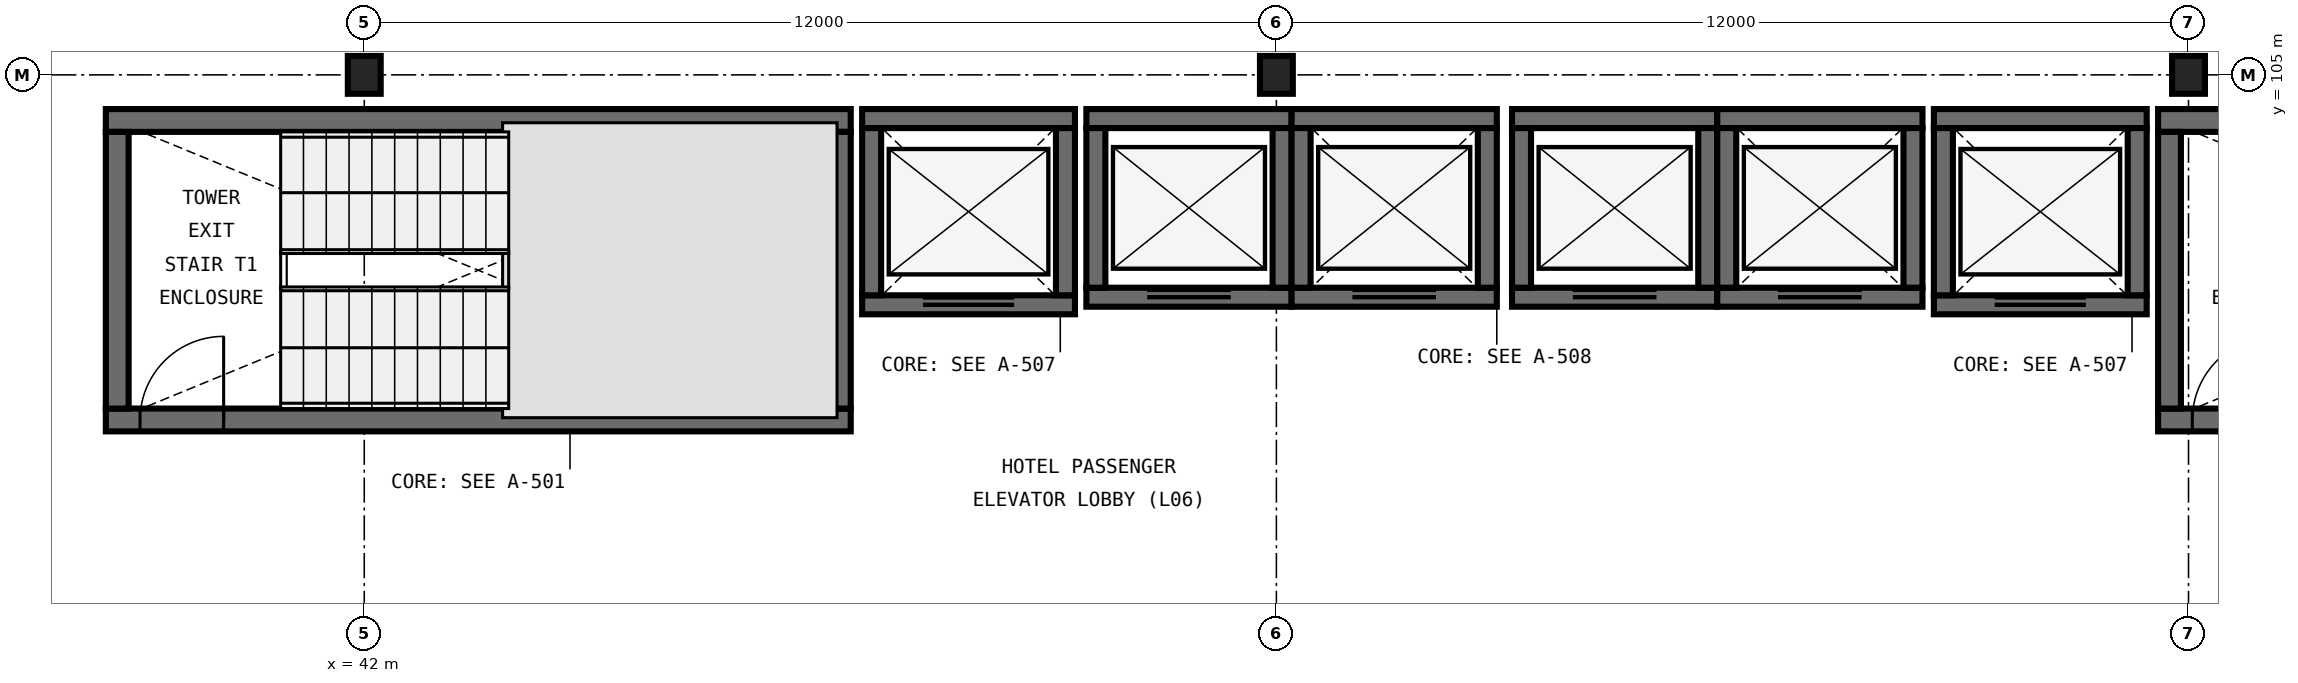
"""IFC4 building model, lengths in metres.
Left out: names, types, materials, properties, quantities, classifications, styles, units other than length and angle.
Written with IfcOpenShell. Run it as: python <this file> out.ifc"""

import sys

from ifc_helpers import new_model, si_unit, direction, frame, frame_2d, origin, origin_2d, place, context, subcontext, project, spatial, rectangle, i_section, extrude, element, fill, save


model = new_model("IFC4")
c1 = context("Model", 3, precision=1e-05, world=origin(), true_north=direction((0.0, 1.0)))
c2 = subcontext(c1, "Body", "Model", "MODEL_VIEW")
j1 = project(units=[si_unit("LENGTHUNIT", "METRE"), si_unit("PLANEANGLEUNIT", "RADIAN")], contexts=[c1])
p1 = place(None, origin())
s1 = spatial("IfcSite", under=j1, at=p1, CompositionType="ELEMENT")
p2 = place(p1, origin())
s2 = spatial("IfcBuilding", under=s1, at=p2, CompositionType="ELEMENT")
p3 = place(p2, frame((0.0, 0.0, 31.2)))
s3 = spatial("IfcBuildingStorey", under=s2, at=p3, CompositionType="ELEMENT", Elevation=31.2)
for number, where, z_axis, x_axis in (
    (1, (42.0, 105.0, 0.0), (0.0, 0.0, 1.0), (1.0, 0.0, 0.0)),
    (2, (54.0, 105.0, 0.0), (0.0, 0.0, 1.0), (1.0, 0.0, 0.0)),
    (3, (66.0, 105.0, 0.0), (0.0, 0.0, 1.0), (1.0, 0.0, 0.0)),
):
    element("IfcColumn", number, at=place(p3, frame(where, z_axis=z_axis, x_axis=x_axis)), inside=s3, PredefinedType="COLUMN", context=c2, shape_type="SweptSolid", body=[
        extrude(i_section(OverallWidth=0.432, OverallDepth=0.498, WebThickness=0.056, FlangeThickness=0.089, FilletRadius=0.031, at=origin_2d()), origin(), (0.0, 0.0, 1.0), 3.6),
    ])
p4 = place(p3, frame((38.6, 100.46, 0.0), z_axis=(0.0, 0.0, 1.0), x_axis=(1.0, 0.0, 0.0)))
e4 = element("IfcWall", 4, at=p4, inside=s3, PredefinedType="SHEAR", context=c2, shape_type="SweptSolid", body=[
    extrude(rectangle(XDim=9.8, YDim=0.3, at=frame_2d((4.9, 0.0))), origin(), (0.0, 0.0, 1.0), 3.6),
])
p5 = place(p4, frame((0.45, 0.0, 0.0)))
e5 = element("IfcOpeningElement", 5, at=p5, cuts=e4, PredefinedType="OPENING", context=c2, shape_type="SweptSolid", body=[
    extrude(rectangle(XDim=1.1, YDim=2.2, at=frame_2d((0.55, 1.1))), frame((0.0, 0.165, 0.0), z_axis=(0.0, -1.0, 0.0), x_axis=(1.0, 0.0, 0.0)), (0.0, 0.0, 1.0), 0.33),
])
p6 = place(p3, frame((48.4, 104.4, 0.0), z_axis=(0.0, 0.0, 1.0), x_axis=(-1.0, 0.0, 0.0)))
e6 = element("IfcWall", 6, at=p6, inside=s3, PredefinedType="SHEAR", context=c2, shape_type="SweptSolid", body=[
    extrude(rectangle(XDim=9.8, YDim=0.3, at=frame_2d((4.9, 0.0))), origin(), (0.0, 0.0, 1.0), 3.6),
])
for number, where, z_axis, x_axis in (
    (7, (38.75, 104.25, 0.0), (0.0, 0.0, 1.0), (0.0, -1.0, 0.0)),
    (8, (48.25, 100.61, 0.0), (0.0, 0.0, 1.0), (0.0, 1.0, 0.0)),
):
    element("IfcWall", number, at=place(p3, frame(where, z_axis=z_axis, x_axis=x_axis)), inside=s3, PredefinedType="SHEAR", context=c2, shape_type="SweptSolid", body=[
        extrude(rectangle(XDim=3.64, YDim=0.3, at=frame_2d((1.82, 0.0))), origin(), (0.0, 0.0, 1.0), 3.6),
    ])
p7 = place(p3, frame((65.6, 100.46, 0.0), z_axis=(0.0, 0.0, 1.0), x_axis=(1.0, 0.0, 0.0)))
e9 = element("IfcWall", 9, at=p7, inside=s3, PredefinedType="SHEAR", context=c2, shape_type="SweptSolid", body=[
    extrude(rectangle(XDim=9.8, YDim=0.3, at=frame_2d((4.9, 0.0))), origin(), (0.0, 0.0, 1.0), 3.6),
])
p8 = place(p7, frame((0.45, 0.0, 0.0)))
e10 = element("IfcOpeningElement", 10, at=p8, cuts=e9, PredefinedType="OPENING", context=c2, shape_type="SweptSolid", body=[
    extrude(rectangle(XDim=1.1, YDim=2.2, at=frame_2d((0.55, 1.1))), frame((0.0, 0.165, 0.0), z_axis=(0.0, -1.0, 0.0), x_axis=(1.0, 0.0, 0.0)), (0.0, 0.0, 1.0), 0.33),
])
p9 = place(p3, frame((75.4, 104.4, 0.0), z_axis=(0.0, 0.0, 1.0), x_axis=(-1.0, 0.0, 0.0)))
e11 = element("IfcWall", 11, at=p9, inside=s3, PredefinedType="SHEAR", context=c2, shape_type="SweptSolid", body=[
    extrude(rectangle(XDim=9.8, YDim=0.3, at=frame_2d((4.9, 0.0))), origin(), (0.0, 0.0, 1.0), 3.6),
])
p10 = place(p3, frame((65.75, 104.25, 0.0), z_axis=(0.0, 0.0, 1.0), x_axis=(0.0, -1.0, 0.0)))
e12 = element("IfcWall", 12, at=p10, inside=s3, PredefinedType="SHEAR", context=c2, shape_type="SweptSolid", body=[
    extrude(rectangle(XDim=3.64, YDim=0.3, at=frame_2d((1.82, 0.0))), origin(), (0.0, 0.0, 1.0), 3.6),
])
p11 = place(p3, frame((48.55, 101.975, 0.0), z_axis=(0.0, 0.0, 1.0), x_axis=(1.0, 0.0, 0.0)))
e13 = element("IfcWall", 13, at=p11, inside=s3, PredefinedType="SHEAR", context=c2, shape_type="SweptSolid", body=[
    extrude(rectangle(XDim=2.8, YDim=0.25, at=frame_2d((1.4, 0.0))), origin(), (0.0, 0.0, 1.0), 3.6),
])
p12 = place(p11, frame((0.8, 0.0, 0.0)))
e14 = element("IfcOpeningElement", 14, at=p12, cuts=e13, PredefinedType="OPENING", context=c2, shape_type="SweptSolid", body=[
    extrude(rectangle(XDim=1.2, YDim=2.2, at=frame_2d((0.6, 1.1))), frame((0.0, 0.14, 0.0), z_axis=(0.0, -1.0, 0.0), x_axis=(1.0, 0.0, 0.0)), (0.0, 0.0, 1.0), 0.28),
])
p13 = place(p3, frame((51.35, 104.425, 0.0), z_axis=(0.0, 0.0, 1.0), x_axis=(-1.0, 0.0, 0.0)))
e15 = element("IfcWall", 15, at=p13, inside=s3, PredefinedType="SHEAR", context=c2, shape_type="SweptSolid", body=[
    extrude(rectangle(XDim=2.8, YDim=0.25, at=frame_2d((1.4, 0.0))), origin(), (0.0, 0.0, 1.0), 3.6),
])
for number, where, z_axis, x_axis in (
    (16, (48.675, 104.3, 0.0), (0.0, 0.0, 1.0), (0.0, -1.0, 0.0)),
    (17, (51.225, 102.1, 0.0), (0.0, 0.0, 1.0), (0.0, 1.0, 0.0)),
):
    element("IfcWall", number, at=place(p3, frame(where, z_axis=z_axis, x_axis=x_axis)), inside=s3, PredefinedType="SHEAR", context=c2, shape_type="SweptSolid", body=[
        extrude(rectangle(XDim=2.2, YDim=0.25, at=frame_2d((1.1, 0.0))), origin(), (0.0, 0.0, 1.0), 3.6),
    ])
p14 = place(p3, frame((62.65, 101.975, 0.0), z_axis=(0.0, 0.0, 1.0), x_axis=(1.0, 0.0, 0.0)))
e18 = element("IfcWall", 18, at=p14, inside=s3, PredefinedType="SHEAR", context=c2, shape_type="SweptSolid", body=[
    extrude(rectangle(XDim=2.8, YDim=0.25, at=frame_2d((1.4, 0.0))), origin(), (0.0, 0.0, 1.0), 3.6),
])
p15 = place(p14, frame((0.8, 0.0, 0.0)))
e19 = element("IfcOpeningElement", 19, at=p15, cuts=e18, PredefinedType="OPENING", context=c2, shape_type="SweptSolid", body=[
    extrude(rectangle(XDim=1.2, YDim=2.2, at=frame_2d((0.6, 1.1))), frame((0.0, 0.14, 0.0), z_axis=(0.0, -1.0, 0.0), x_axis=(1.0, 0.0, 0.0)), (0.0, 0.0, 1.0), 0.28),
])
p16 = place(p3, frame((65.45, 104.425, 0.0), z_axis=(0.0, 0.0, 1.0), x_axis=(-1.0, 0.0, 0.0)))
e20 = element("IfcWall", 20, at=p16, inside=s3, PredefinedType="SHEAR", context=c2, shape_type="SweptSolid", body=[
    extrude(rectangle(XDim=2.8, YDim=0.25, at=frame_2d((1.4, 0.0))), origin(), (0.0, 0.0, 1.0), 3.6),
])
for number, where, z_axis, x_axis in (
    (21, (62.775, 104.3, 0.0), (0.0, 0.0, 1.0), (0.0, -1.0, 0.0)),
    (22, (65.325, 102.1, 0.0), (0.0, 0.0, 1.0), (0.0, 1.0, 0.0)),
):
    element("IfcWall", number, at=place(p3, frame(where, z_axis=z_axis, x_axis=x_axis)), inside=s3, PredefinedType="SHEAR", context=c2, shape_type="SweptSolid", body=[
        extrude(rectangle(XDim=2.2, YDim=0.25, at=frame_2d((1.1, 0.0))), origin(), (0.0, 0.0, 1.0), 3.6),
    ])
p17 = place(p3, frame((51.5, 102.075, 0.0), z_axis=(0.0, 0.0, 1.0), x_axis=(1.0, 0.0, 0.0)))
e23 = element("IfcWall", 23, at=p17, inside=s3, PredefinedType="SHEAR", context=c2, shape_type="SweptSolid", body=[
    extrude(rectangle(XDim=2.7, YDim=0.25, at=frame_2d((1.35, 0.0))), origin(), (0.0, 0.0, 1.0), 3.6),
])
p18 = place(p17, frame((0.8, 0.0, 0.0)))
e24 = element("IfcOpeningElement", 24, at=p18, cuts=e23, PredefinedType="OPENING", context=c2, shape_type="SweptSolid", body=[
    extrude(rectangle(XDim=1.1, YDim=2.2, at=frame_2d((0.55, 1.1))), frame((0.0, 0.14, 0.0), z_axis=(0.0, -1.0, 0.0), x_axis=(1.0, 0.0, 0.0)), (0.0, 0.0, 1.0), 0.28),
])
p19 = place(p3, frame((54.2, 104.425, 0.0), z_axis=(0.0, 0.0, 1.0), x_axis=(-1.0, 0.0, 0.0)))
e25 = element("IfcWall", 25, at=p19, inside=s3, PredefinedType="SHEAR", context=c2, shape_type="SweptSolid", body=[
    extrude(rectangle(XDim=2.7, YDim=0.25, at=frame_2d((1.35, 0.0))), origin(), (0.0, 0.0, 1.0), 3.6),
])
for number, where, z_axis, x_axis in (
    (26, (51.625, 104.3, 0.0), (0.0, 0.0, 1.0), (0.0, -1.0, 0.0)),
    (27, (54.075, 102.2, 0.0), (0.0, 0.0, 1.0), (0.0, 1.0, 0.0)),
):
    element("IfcWall", number, at=place(p3, frame(where, z_axis=z_axis, x_axis=x_axis)), inside=s3, PredefinedType="SHEAR", context=c2, shape_type="SweptSolid", body=[
        extrude(rectangle(XDim=2.1, YDim=0.25, at=frame_2d((1.05, 0.0))), origin(), (0.0, 0.0, 1.0), 3.6),
    ])
p20 = place(p3, frame((54.2, 102.075, 0.0), z_axis=(0.0, 0.0, 1.0), x_axis=(1.0, 0.0, 0.0)))
e28 = element("IfcWall", 28, at=p20, inside=s3, PredefinedType="SHEAR", context=c2, shape_type="SweptSolid", body=[
    extrude(rectangle(XDim=2.7, YDim=0.25, at=frame_2d((1.35, 0.0))), origin(), (0.0, 0.0, 1.0), 3.6),
])
p21 = place(p20, frame((0.8, 0.0, 0.0)))
e29 = element("IfcOpeningElement", 29, at=p21, cuts=e28, PredefinedType="OPENING", context=c2, shape_type="SweptSolid", body=[
    extrude(rectangle(XDim=1.1, YDim=2.2, at=frame_2d((0.55, 1.1))), frame((0.0, 0.14, 0.0), z_axis=(0.0, -1.0, 0.0), x_axis=(1.0, 0.0, 0.0)), (0.0, 0.0, 1.0), 0.28),
])
p22 = place(p3, frame((56.9, 104.425, 0.0), z_axis=(0.0, 0.0, 1.0), x_axis=(-1.0, 0.0, 0.0)))
e30 = element("IfcWall", 30, at=p22, inside=s3, PredefinedType="SHEAR", context=c2, shape_type="SweptSolid", body=[
    extrude(rectangle(XDim=2.7, YDim=0.25, at=frame_2d((1.35, 0.0))), origin(), (0.0, 0.0, 1.0), 3.6),
])
for number, where, z_axis, x_axis in (
    (31, (54.325, 104.3, 0.0), (0.0, 0.0, 1.0), (0.0, -1.0, 0.0)),
    (32, (56.775, 102.2, 0.0), (0.0, 0.0, 1.0), (0.0, 1.0, 0.0)),
):
    element("IfcWall", number, at=place(p3, frame(where, z_axis=z_axis, x_axis=x_axis)), inside=s3, PredefinedType="SHEAR", context=c2, shape_type="SweptSolid", body=[
        extrude(rectangle(XDim=2.1, YDim=0.25, at=frame_2d((1.05, 0.0))), origin(), (0.0, 0.0, 1.0), 3.6),
    ])
p23 = place(p3, frame((57.1, 102.075, 0.0), z_axis=(0.0, 0.0, 1.0), x_axis=(1.0, 0.0, 0.0)))
e33 = element("IfcWall", 33, at=p23, inside=s3, PredefinedType="SHEAR", context=c2, shape_type="SweptSolid", body=[
    extrude(rectangle(XDim=2.7, YDim=0.25, at=frame_2d((1.35, 0.0))), origin(), (0.0, 0.0, 1.0), 3.6),
])
p24 = place(p23, frame((0.8, 0.0, 0.0)))
e34 = element("IfcOpeningElement", 34, at=p24, cuts=e33, PredefinedType="OPENING", context=c2, shape_type="SweptSolid", body=[
    extrude(rectangle(XDim=1.1, YDim=2.2, at=frame_2d((0.55, 1.1))), frame((0.0, 0.14, 0.0), z_axis=(0.0, -1.0, 0.0), x_axis=(1.0, 0.0, 0.0)), (0.0, 0.0, 1.0), 0.28),
])
p25 = place(p3, frame((59.8, 104.425, 0.0), z_axis=(0.0, 0.0, 1.0), x_axis=(-1.0, 0.0, 0.0)))
e35 = element("IfcWall", 35, at=p25, inside=s3, PredefinedType="SHEAR", context=c2, shape_type="SweptSolid", body=[
    extrude(rectangle(XDim=2.7, YDim=0.25, at=frame_2d((1.35, 0.0))), origin(), (0.0, 0.0, 1.0), 3.6),
])
for number, where, z_axis, x_axis in (
    (36, (57.225, 104.3, 0.0), (0.0, 0.0, 1.0), (0.0, -1.0, 0.0)),
    (37, (59.675, 102.2, 0.0), (0.0, 0.0, 1.0), (0.0, 1.0, 0.0)),
):
    element("IfcWall", number, at=place(p3, frame(where, z_axis=z_axis, x_axis=x_axis)), inside=s3, PredefinedType="SHEAR", context=c2, shape_type="SweptSolid", body=[
        extrude(rectangle(XDim=2.1, YDim=0.25, at=frame_2d((1.05, 0.0))), origin(), (0.0, 0.0, 1.0), 3.6),
    ])
p26 = place(p3, frame((59.8, 102.075, 0.0), z_axis=(0.0, 0.0, 1.0), x_axis=(1.0, 0.0, 0.0)))
e38 = element("IfcWall", 38, at=p26, inside=s3, PredefinedType="SHEAR", context=c2, shape_type="SweptSolid", body=[
    extrude(rectangle(XDim=2.7, YDim=0.25, at=frame_2d((1.35, 0.0))), origin(), (0.0, 0.0, 1.0), 3.6),
])
p27 = place(p26, frame((0.8, 0.0, 0.0)))
e39 = element("IfcOpeningElement", 39, at=p27, cuts=e38, PredefinedType="OPENING", context=c2, shape_type="SweptSolid", body=[
    extrude(rectangle(XDim=1.1, YDim=2.2, at=frame_2d((0.55, 1.1))), frame((0.0, 0.14, 0.0), z_axis=(0.0, -1.0, 0.0), x_axis=(1.0, 0.0, 0.0)), (0.0, 0.0, 1.0), 0.28),
])
p28 = place(p3, frame((62.5, 104.425, 0.0), z_axis=(0.0, 0.0, 1.0), x_axis=(-1.0, 0.0, 0.0)))
e40 = element("IfcWall", 40, at=p28, inside=s3, PredefinedType="SHEAR", context=c2, shape_type="SweptSolid", body=[
    extrude(rectangle(XDim=2.7, YDim=0.25, at=frame_2d((1.35, 0.0))), origin(), (0.0, 0.0, 1.0), 3.6),
])
for number, where, z_axis, x_axis in (
    (41, (59.925, 104.3, 0.0), (0.0, 0.0, 1.0), (0.0, -1.0, 0.0)),
    (42, (62.375, 102.2, 0.0), (0.0, 0.0, 1.0), (0.0, 1.0, 0.0)),
):
    element("IfcWall", number, at=place(p3, frame(where, z_axis=z_axis, x_axis=x_axis)), inside=s3, PredefinedType="SHEAR", context=c2, shape_type="SweptSolid", body=[
        extrude(rectangle(XDim=2.1, YDim=0.25, at=frame_2d((1.05, 0.0))), origin(), (0.0, 0.0, 1.0), 3.6),
    ])
p29 = place(p5, origin())
e43 = element("IfcDoor", 43, at=p29, inside=s3, OperationType="SINGLE_SWING_RIGHT", PredefinedType="DOOR", context=c2, shape_type="SweptSolid", body=[
    extrude(rectangle(XDim=1.1, YDim=2.2, at=frame_2d((0.55, 1.1))), frame((0.0, 0.025, 0.0), z_axis=(0.0, -1.0, 0.0), x_axis=(1.0, 0.0, 0.0)), (0.0, 0.0, 1.0), 0.05),
])
fill(e5, e43)
p30 = place(p8, origin())
e44 = element("IfcDoor", 44, at=p30, inside=s3, OperationType="SINGLE_SWING_RIGHT", PredefinedType="DOOR", context=c2, shape_type="SweptSolid", body=[
    extrude(rectangle(XDim=1.1, YDim=2.2, at=frame_2d((0.55, 1.1))), frame((0.0, 0.025, 0.0), z_axis=(0.0, -1.0, 0.0), x_axis=(1.0, 0.0, 0.0)), (0.0, 0.0, 1.0), 0.05),
])
fill(e10, e44)
p31 = place(p12, origin())
e45 = element("IfcDoor", 45, at=p31, inside=s3, OperationType="DOUBLE_DOOR_SLIDING", PredefinedType="DOOR", context=c2, shape_type="SweptSolid", body=[
    extrude(rectangle(XDim=1.2, YDim=2.2, at=frame_2d((0.6, 1.1))), frame((0.0, 0.025, 0.0), z_axis=(0.0, -1.0, 0.0), x_axis=(1.0, 0.0, 0.0)), (0.0, 0.0, 1.0), 0.05),
])
fill(e14, e45)
p32 = place(p15, origin())
e46 = element("IfcDoor", 46, at=p32, inside=s3, OperationType="DOUBLE_DOOR_SLIDING", PredefinedType="DOOR", context=c2, shape_type="SweptSolid", body=[
    extrude(rectangle(XDim=1.2, YDim=2.2, at=frame_2d((0.6, 1.1))), frame((0.0, 0.025, 0.0), z_axis=(0.0, -1.0, 0.0), x_axis=(1.0, 0.0, 0.0)), (0.0, 0.0, 1.0), 0.05),
])
fill(e19, e46)
p33 = place(p18, origin())
e47 = element("IfcDoor", 47, at=p33, inside=s3, OperationType="DOUBLE_DOOR_SLIDING", PredefinedType="DOOR", context=c2, shape_type="SweptSolid", body=[
    extrude(rectangle(XDim=1.1, YDim=2.2, at=frame_2d((0.55, 1.1))), frame((0.0, 0.025, 0.0), z_axis=(0.0, -1.0, 0.0), x_axis=(1.0, 0.0, 0.0)), (0.0, 0.0, 1.0), 0.05),
])
fill(e24, e47)
p34 = place(p21, origin())
e48 = element("IfcDoor", 48, at=p34, inside=s3, OperationType="DOUBLE_DOOR_SLIDING", PredefinedType="DOOR", context=c2, shape_type="SweptSolid", body=[
    extrude(rectangle(XDim=1.1, YDim=2.2, at=frame_2d((0.55, 1.1))), frame((0.0, 0.025, 0.0), z_axis=(0.0, -1.0, 0.0), x_axis=(1.0, 0.0, 0.0)), (0.0, 0.0, 1.0), 0.05),
])
fill(e29, e48)
p35 = place(p24, origin())
e49 = element("IfcDoor", 49, at=p35, inside=s3, OperationType="DOUBLE_DOOR_SLIDING", PredefinedType="DOOR", context=c2, shape_type="SweptSolid", body=[
    extrude(rectangle(XDim=1.1, YDim=2.2, at=frame_2d((0.55, 1.1))), frame((0.0, 0.025, 0.0), z_axis=(0.0, -1.0, 0.0), x_axis=(1.0, 0.0, 0.0)), (0.0, 0.0, 1.0), 0.05),
])
fill(e34, e49)
p36 = place(p27, origin())
e50 = element("IfcDoor", 50, at=p36, inside=s3, OperationType="DOUBLE_DOOR_SLIDING", PredefinedType="DOOR", context=c2, shape_type="SweptSolid", body=[
    extrude(rectangle(XDim=1.1, YDim=2.2, at=frame_2d((0.55, 1.1))), frame((0.0, 0.025, 0.0), z_axis=(0.0, -1.0, 0.0), x_axis=(1.0, 0.0, 0.0)), (0.0, 0.0, 1.0), 0.05),
])
fill(e39, e50)
save(model, sys.argv[1])
